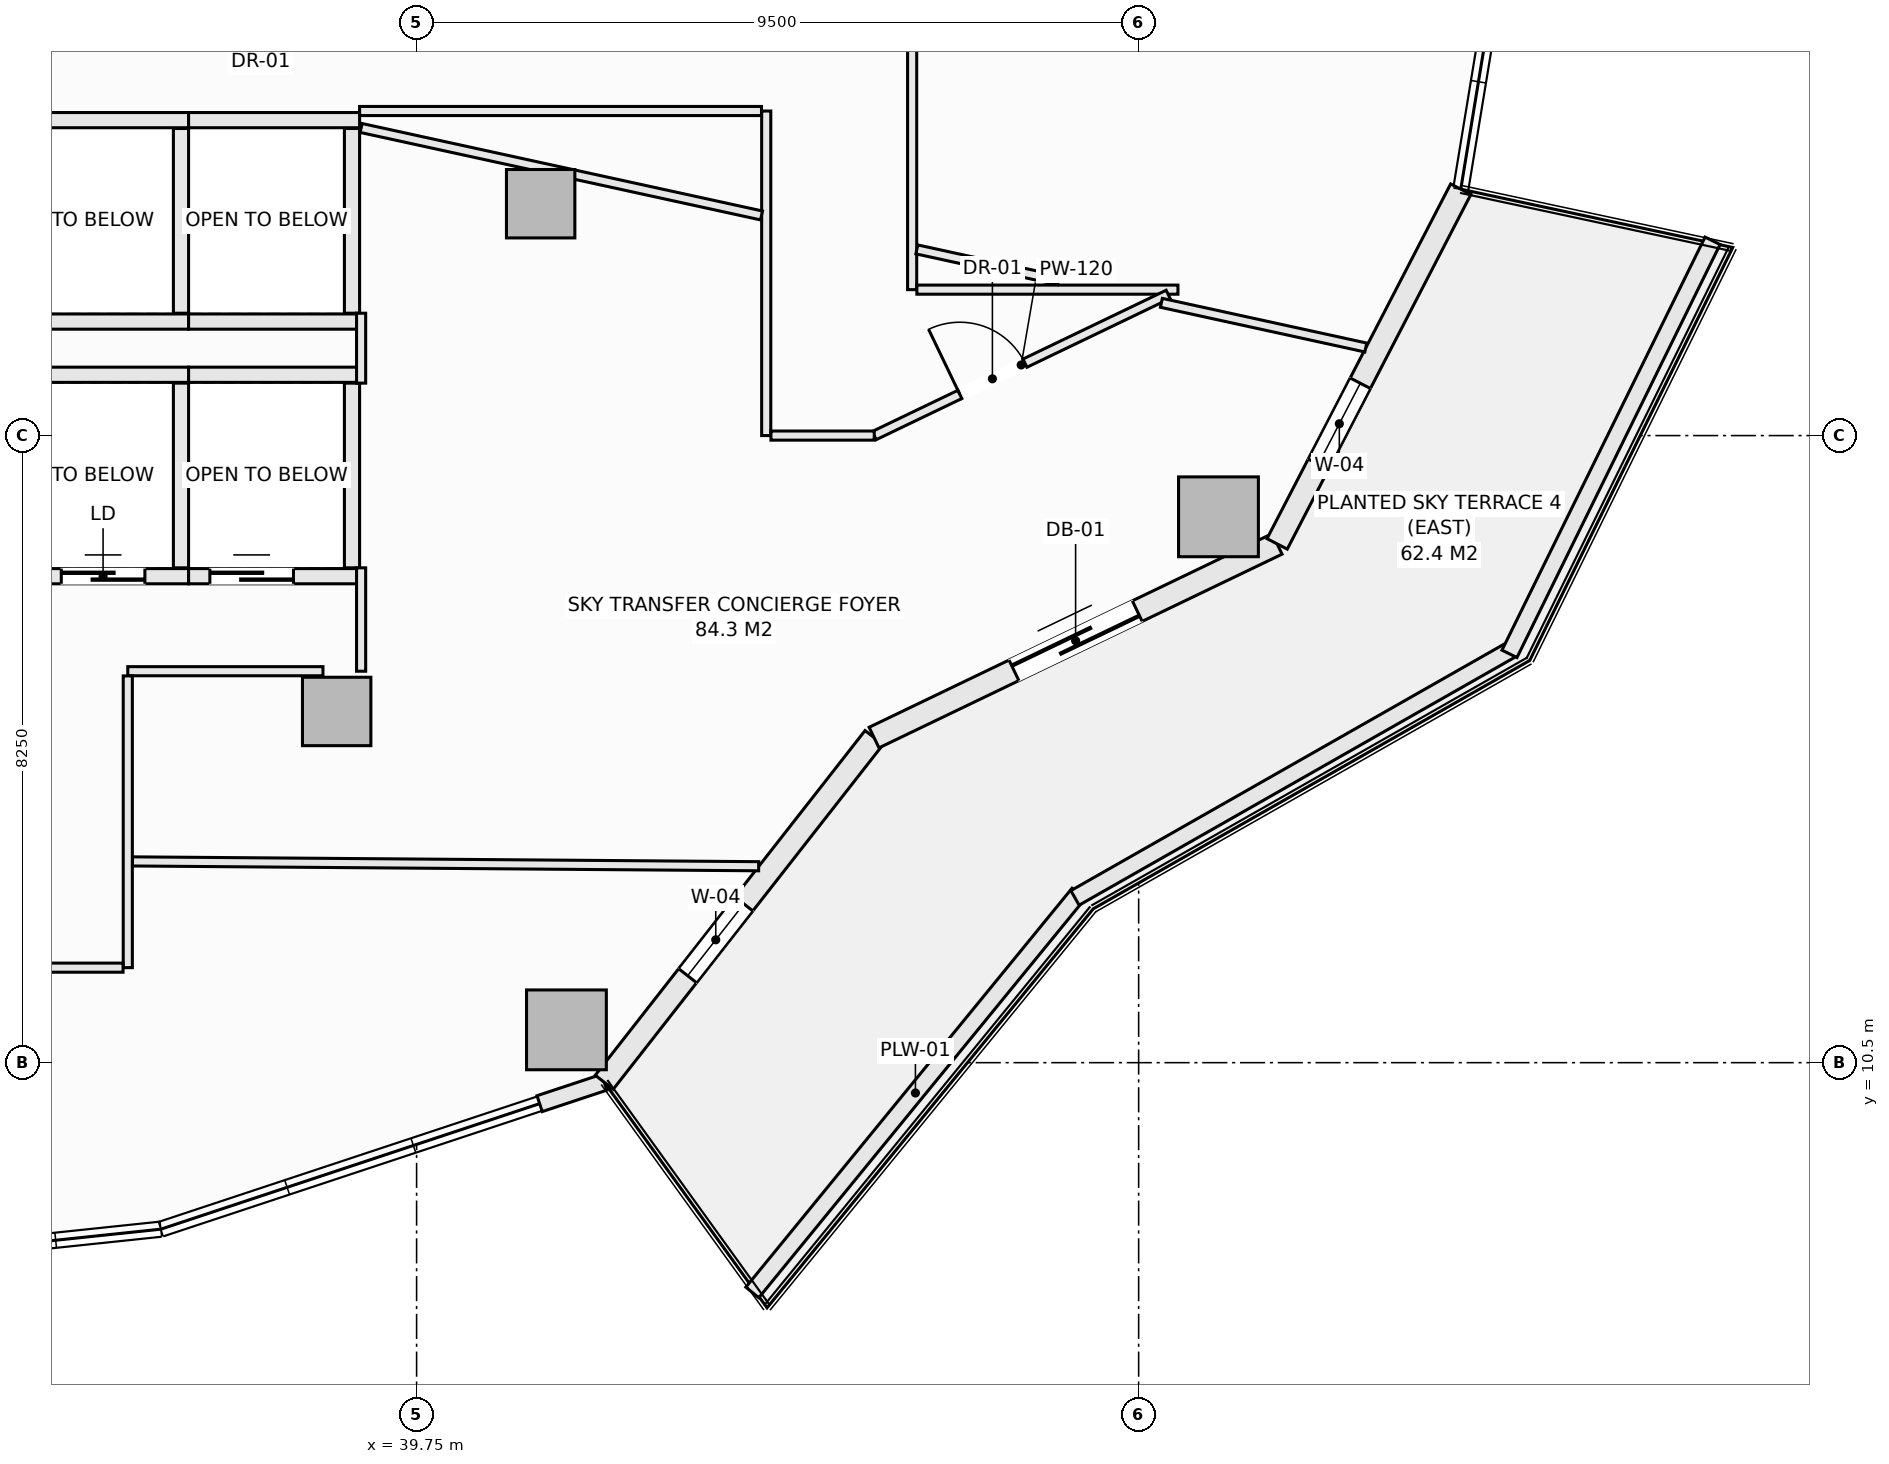
"""IFC4 building model, lengths in metres.
Left out: names, types, materials, properties, quantities, classifications, styles, units other than length and angle.
Written with IfcOpenShell. Run it as: python <this file> out.ifc"""

import sys

from ifc_helpers import new_model, si_unit, direction, frame, frame_2d, origin, origin_2d, place, context, subcontext, project, spatial, rectangle, extrude, element, fill, save


model = new_model("IFC4")
c1 = context("Model", 3, precision=1e-05, world=origin(), true_north=direction((0.0, 1.0)))
c2 = subcontext(c1, "Body", "Model", "MODEL_VIEW")
j1 = project(units=[si_unit("LENGTHUNIT", "METRE"), si_unit("PLANEANGLEUNIT", "RADIAN")], contexts=[c1])
p1 = place(None, origin())
s1 = spatial("IfcSite", under=j1, at=p1, CompositionType="ELEMENT")
p2 = place(p1, origin())
s2 = spatial("IfcBuilding", under=s1, at=p2, CompositionType="ELEMENT")
p3 = place(p2, frame((0.0, 0.0, 100.8)))
s3 = spatial("IfcBuildingStorey", under=s2, at=p3, CompositionType="ELEMENT", Elevation=100.8)
for number, where, z_axis, x_axis in (
    (1, (41.721, 10.932, -0.28), (0.0, 0.0, 1.0), (1.0, 0.0, 0.0)),
    (2, (50.3, 17.681, -0.28), (0.0, 0.0, 1.0), (1.0, 0.0, 0.0)),
):
    element("IfcColumn", number, at=place(p3, frame(where, z_axis=z_axis, x_axis=x_axis)), inside=s3, PredefinedType="COLUMN", context=c2, shape_type="SweptSolid", body=[
        extrude(rectangle(XDim=1.05, YDim=1.05, at=origin_2d()), origin(), (0.0, 0.0, 1.0), 4.51),
    ])
for number, where, z_axis, x_axis in (
    (3, (38.698, 15.121, -0.28), (0.0, 0.0, 1.0), (1.0, 0.0, 0.0)),
    (4, (41.382, 21.801, -0.28), (0.0, 0.0, 1.0), (1.0, 0.0, 0.0)),
):
    element("IfcColumn", number, at=place(p3, frame(where, z_axis=z_axis, x_axis=x_axis)), inside=s3, PredefinedType="COLUMN", context=c2, shape_type="SweptSolid", body=[
        extrude(rectangle(XDim=0.9, YDim=0.9, at=origin_2d()), origin(), (0.0, 0.0, 1.0), 4.51),
    ])
p4 = place(p3, frame((41.369, 9.961, 0.0), z_axis=(0.0, 0.0, 1.0), x_axis=(0.949227107477, 0.314591637573, 0.0)))
e5 = element("IfcWall", 5, at=p4, inside=s3, PredefinedType="SOLIDWALL", context=c2, shape_type="SweptSolid", body=[
    extrude(rectangle(XDim=0.896, YDim=0.22, at=frame_2d((0.448, 0.0))), origin(), (0.0, 0.0, 1.0), 3.753),
])
p5 = place(p3, frame((42.219, 10.242, 0.0), z_axis=(0.0, 0.0, 1.0), x_axis=(0.616435134162, 0.787405693001, 0.0)))
e6 = element("IfcWall", 6, at=p5, inside=s3, PredefinedType="SOLIDWALL", context=c2, shape_type="SweptSolid", body=[
    extrude(rectangle(XDim=5.759, YDim=0.3, at=frame_2d((2.879, 0.0))), origin(), (0.0, 0.0, 1.0), 3.753),
])
p6 = place(p5, frame((1.78, 0.0, 0.72)))
e7 = element("IfcOpeningElement", 7, at=p6, cuts=e6, PredefinedType="OPENING", context=c2, shape_type="SweptSolid", body=[
    extrude(rectangle(XDim=1.2, YDim=1.65, at=frame_2d((0.6, 0.825))), frame((0.0, 0.16, 0.0), z_axis=(0.0, -1.0, 0.0), x_axis=(1.0, 0.0, 0.0)), (0.0, 0.0, 1.0), 0.32),
])
p7 = place(p3, frame((45.769, 14.777, 0.0), z_axis=(0.0, 0.0, 1.0), x_axis=(0.901370184739, 0.433049408339, 0.0)))
e8 = element("IfcWall", 8, at=p7, inside=s3, PredefinedType="SOLIDWALL", context=c2, shape_type="SweptSolid", body=[
    extrude(rectangle(XDim=5.884, YDim=0.3, at=frame_2d((2.942, 0.0))), origin(), (0.0, 0.0, 1.0), 3.753),
])
p8 = place(p7, frame((2.042, 0.0, 0.0)))
e9 = element("IfcOpeningElement", 9, at=p8, cuts=e8, PredefinedType="OPENING", context=c2, shape_type="SweptSolid", body=[
    extrude(rectangle(XDim=1.8, YDim=2.25, at=frame_2d((0.9, 1.125))), frame((0.0, 0.16, 0.0), z_axis=(0.0, -1.0, 0.0), x_axis=(1.0, 0.0, 0.0)), (0.0, 0.0, 1.0), 0.32),
])
p9 = place(p3, frame((51.072, 17.325, 0.0), z_axis=(0.0, 0.0, 1.0), x_axis=(0.459767899643, 0.888039119892, 0.0)))
e10 = element("IfcWall", 10, at=p9, inside=s3, PredefinedType="SOLIDWALL", context=c2, shape_type="SweptSolid", body=[
    extrude(rectangle(XDim=5.255, YDim=0.3, at=frame_2d((2.628, 0.0))), origin(), (0.0, 0.0, 1.0), 3.753),
])
p10 = place(p9, frame((1.18, 0.0, 0.72)))
e11 = element("IfcOpeningElement", 11, at=p10, cuts=e10, PredefinedType="OPENING", context=c2, shape_type="SweptSolid", body=[
    extrude(rectangle(XDim=1.2, YDim=1.65, at=frame_2d((0.6, 0.825))), frame((0.0, 0.16, 0.0), z_axis=(0.0, -1.0, 0.0), x_axis=(1.0, 0.0, 0.0)), (0.0, 0.0, 1.0), 0.32),
])
p11 = place(p3, frame((44.167, 7.477, 0.0), z_axis=(0.0, 0.0, 1.0), x_axis=(0.633002467947, 0.77414977593, 0.0)))
e12 = element("IfcWall", 12, at=p11, inside=s3, PredefinedType="PARAPET", context=c2, shape_type="SweptSolid", body=[
    extrude(rectangle(XDim=6.78, YDim=0.22, at=frame_2d((3.39, 0.0))), origin(), (0.0, 0.0, 1.0), 0.52),
])
p12 = place(p3, frame((48.413, 12.668, 0.0), z_axis=(0.0, 0.0, 1.0), x_axis=(0.869187658335, 0.494482370361, 0.0)))
e13 = element("IfcWall", 13, at=p12, inside=s3, PredefinedType="PARAPET", context=c2, shape_type="SweptSolid", body=[
    extrude(rectangle(XDim=6.606, YDim=0.22, at=frame_2d((3.303, 0.0))), origin(), (0.0, 0.0, 1.0), 0.52),
])
p13 = place(p3, frame((54.129, 15.878, 0.0), z_axis=(0.0, 0.0, 1.0), x_axis=(0.441269631716, 0.897374566235, 0.0)))
e14 = element("IfcWall", 14, at=p13, inside=s3, PredefinedType="PARAPET", context=c2, shape_type="SweptSolid", body=[
    extrude(rectangle(XDim=6.056, YDim=0.22, at=frame_2d((3.028, 0.0))), origin(), (0.0, 0.0, 1.0), 0.52),
])
p14 = place(p3, frame((34.5, 19.55, 0.0), z_axis=(0.0, 0.0, 1.0), x_axis=(1.0, 0.0, 0.0)))
e15 = element("IfcWall", 15, at=p14, inside=s3, PredefinedType="SOLIDWALL", context=c2, shape_type="SweptSolid", body=[
    extrude(rectangle(XDim=2.25, YDim=0.2, at=frame_2d((1.125, 0.0))), origin(), (0.0, 0.0, 1.0), 4.23),
])
p15 = place(p3, frame((34.5, 16.9, 0.0), z_axis=(0.0, 0.0, 1.0), x_axis=(1.0, 0.0, 0.0)))
e16 = element("IfcWall", 16, at=p15, inside=s3, PredefinedType="SOLIDWALL", context=c2, shape_type="SweptSolid", body=[
    extrude(rectangle(XDim=2.25, YDim=0.2, at=frame_2d((1.125, 0.0))), origin(), (0.0, 0.0, 1.0), 4.23),
])
p16 = place(p15, frame((0.575, 0.0, 0.0)))
e17 = element("IfcOpeningElement", 17, at=p16, cuts=e16, PredefinedType="OPENING", context=c2, shape_type="SweptSolid", body=[
    extrude(rectangle(XDim=1.1, YDim=2.2, at=frame_2d((0.55, 1.1))), frame((0.0, 0.11, 0.0), z_axis=(0.0, -1.0, 0.0), x_axis=(1.0, 0.0, 0.0)), (0.0, 0.0, 1.0), 0.22),
])
p17 = place(p3, frame((36.65, 17.01, 0.0), z_axis=(0.0, 0.0, 1.0), x_axis=(0.0, 1.0, 0.0)))
e18 = element("IfcWall", 18, at=p17, inside=s3, PredefinedType="SOLIDWALL", context=c2, shape_type="SweptSolid", body=[
    extrude(rectangle(XDim=2.43, YDim=0.2, at=frame_2d((1.215, 0.0))), origin(), (0.0, 0.0, 1.0), 4.23),
])
p18 = place(p3, frame((36.75, 19.55, 0.0), z_axis=(0.0, 0.0, 1.0), x_axis=(1.0, 0.0, 0.0)))
e19 = element("IfcWall", 19, at=p18, inside=s3, PredefinedType="SOLIDWALL", context=c2, shape_type="SweptSolid", body=[
    extrude(rectangle(XDim=2.25, YDim=0.2, at=frame_2d((1.125, 0.0))), origin(), (0.0, 0.0, 1.0), 4.23),
])
p19 = place(p3, frame((36.75, 16.9, 0.0), z_axis=(0.0, 0.0, 1.0), x_axis=(1.0, 0.0, 0.0)))
e20 = element("IfcWall", 20, at=p19, inside=s3, PredefinedType="SOLIDWALL", context=c2, shape_type="SweptSolid", body=[
    extrude(rectangle(XDim=2.25, YDim=0.2, at=frame_2d((1.125, 0.0))), origin(), (0.0, 0.0, 1.0), 4.23),
])
p20 = place(p19, frame((0.28, 0.0, 0.0)))
e21 = element("IfcOpeningElement", 21, at=p20, cuts=e20, PredefinedType="OPENING", context=c2, shape_type="SweptSolid", body=[
    extrude(rectangle(XDim=1.1, YDim=2.2, at=frame_2d((0.55, 1.1))), frame((0.0, 0.11, 0.0), z_axis=(0.0, -1.0, 0.0), x_axis=(1.0, 0.0, 0.0)), (0.0, 0.0, 1.0), 0.22),
])
p21 = place(p3, frame((38.9, 17.01, 0.0), z_axis=(0.0, 0.0, 1.0), x_axis=(0.0, 1.0, 0.0)))
e22 = element("IfcWall", 22, at=p21, inside=s3, PredefinedType="SOLIDWALL", context=c2, shape_type="SweptSolid", body=[
    extrude(rectangle(XDim=2.43, YDim=0.2, at=frame_2d((1.215, 0.0))), origin(), (0.0, 0.0, 1.0), 4.23),
])
for number, where, z_axis, x_axis in (
    (23, (34.5, 22.9, 0.0), (0.0, 0.0, 1.0), (1.0, 0.0, 0.0)),
    (24, (34.5, 20.25, 0.0), (0.0, 0.0, 1.0), (1.0, 0.0, 0.0)),
):
    element("IfcWall", number, at=place(p3, frame(where, z_axis=z_axis, x_axis=x_axis)), inside=s3, PredefinedType="SOLIDWALL", context=c2, shape_type="SweptSolid", body=[
        extrude(rectangle(XDim=2.25, YDim=0.2, at=frame_2d((1.125, 0.0))), origin(), (0.0, 0.0, 1.0), 4.23),
    ])
p22 = place(p3, frame((36.65, 20.36, 0.0), z_axis=(0.0, 0.0, 1.0), x_axis=(0.0, 1.0, 0.0)))
e25 = element("IfcWall", 25, at=p22, inside=s3, PredefinedType="SOLIDWALL", context=c2, shape_type="SweptSolid", body=[
    extrude(rectangle(XDim=2.43, YDim=0.2, at=frame_2d((1.215, 0.0))), origin(), (0.0, 0.0, 1.0), 4.23),
])
for number, where, z_axis, x_axis in (
    (26, (36.75, 22.9, 0.0), (0.0, 0.0, 1.0), (1.0, 0.0, 0.0)),
    (27, (36.75, 20.25, 0.0), (0.0, 0.0, 1.0), (1.0, 0.0, 0.0)),
):
    element("IfcWall", number, at=place(p3, frame(where, z_axis=z_axis, x_axis=x_axis)), inside=s3, PredefinedType="SOLIDWALL", context=c2, shape_type="SweptSolid", body=[
        extrude(rectangle(XDim=2.25, YDim=0.2, at=frame_2d((1.125, 0.0))), origin(), (0.0, 0.0, 1.0), 4.23),
    ])
p23 = place(p3, frame((38.9, 20.36, 0.0), z_axis=(0.0, 0.0, 1.0), x_axis=(0.0, 1.0, 0.0)))
e28 = element("IfcWall", 28, at=p23, inside=s3, PredefinedType="SOLIDWALL", context=c2, shape_type="SweptSolid", body=[
    extrude(rectangle(XDim=2.43, YDim=0.2, at=frame_2d((1.215, 0.0))), origin(), (0.0, 0.0, 1.0), 4.23),
])
p24 = place(p3, frame((35.95, 15.65, 0.0), z_axis=(0.0, 0.0, 1.0), x_axis=(1.0, 0.0, 0.0)))
e29 = element("IfcWall", 29, at=p24, inside=s3, PredefinedType="PARTITIONING", context=c2, shape_type="SweptSolid", body=[
    extrude(rectangle(XDim=2.568, YDim=0.12, at=frame_2d((1.284, 0.0))), origin(), (0.0, 0.0, 1.0), 4.23),
])
p25 = place(p3, frame((35.95, 11.75, 0.0), z_axis=(0.0, 0.0, 1.0), x_axis=(0.0, 1.0, 0.0)))
e30 = element("IfcWall", 30, at=p25, inside=s3, PredefinedType="PARTITIONING", context=c2, shape_type="SweptSolid", body=[
    extrude(rectangle(XDim=3.838, YDim=0.12, at=frame_2d((1.919, 0.0))), origin(), (0.0, 0.0, 1.0), 4.23),
])
p26 = place(p3, frame((27.227, 11.75, 0.0), z_axis=(0.0, 0.0, 1.0), x_axis=(1.0, 0.0, 0.0)))
e31 = element("IfcWall", 31, at=p26, inside=s3, PredefinedType="PARTITIONING", context=c2, shape_type="SweptSolid", body=[
    extrude(rectangle(XDim=8.661, YDim=0.12, at=frame_2d((4.331, 0.0))), origin(), (0.0, 0.0, 1.0), 4.23),
])
p27 = place(p26, frame((3.855, 0.0, 0.0)))
e32 = element("IfcOpeningElement", 32, at=p27, cuts=e31, PredefinedType="OPENING", context=c2, shape_type="SweptSolid", body=[
    extrude(rectangle(XDim=0.95, YDim=2.1, at=frame_2d((0.475, 1.05))), frame((0.0, 0.07, 0.0), z_axis=(0.0, -1.0, 0.0), x_axis=(1.0, 0.0, 0.0)), (0.0, 0.0, 1.0), 0.14),
])
p28 = place(p3, frame((44.35, 18.75, 0.0), z_axis=(0.0, 0.0, 1.0), x_axis=(0.0, 1.0, 0.0)))
e33 = element("IfcWall", 33, at=p28, inside=s3, PredefinedType="PARTITIONING", context=c2, shape_type="SweptSolid", body=[
    extrude(rectangle(XDim=4.27, YDim=0.12, at=frame_2d((2.135, 0.0))), origin(), (0.0, 0.0, 1.0), 4.23),
])
p29 = place(p3, frame((46.27, 20.67, 0.0), z_axis=(0.0, 0.0, 1.0), x_axis=(0.0, 1.0, 0.0)))
e34 = element("IfcWall", 34, at=p29, inside=s3, PredefinedType="PARTITIONING", context=c2, shape_type="SweptSolid", body=[
    extrude(rectangle(XDim=12.098, YDim=0.12, at=frame_2d((6.049, 0.0))), origin(), (0.0, 0.0, 1.0), 4.23),
])
p30 = place(p29, frame((5.637, 0.0, 0.0)))
e35 = element("IfcOpeningElement", 35, at=p30, cuts=e34, PredefinedType="OPENING", context=c2, shape_type="SweptSolid", body=[
    extrude(rectangle(XDim=0.95, YDim=2.1, at=frame_2d((0.475, 1.05))), frame((0.0, 0.07, 0.0), z_axis=(0.0, -1.0, 0.0), x_axis=(1.0, 0.0, 0.0)), (0.0, 0.0, 1.0), 0.14),
])
p31 = place(p3, frame((46.332, 20.67, 0.0), z_axis=(0.0, 0.0, 1.0), x_axis=(1.0, 0.0, 0.0)))
e36 = element("IfcWall", 36, at=p31, inside=s3, PredefinedType="PARTITIONING", context=c2, shape_type="SweptSolid", body=[
    extrude(rectangle(XDim=3.435, YDim=0.12, at=frame_2d((1.718, 0.0))), origin(), (0.0, 0.0, 1.0), 4.23),
])
p32 = place(p3, frame((45.771, 18.75, 0.0), z_axis=(0.0, 0.0, 1.0), x_axis=(0.901361373705, 0.433067747578, 0.0)))
e37 = element("IfcWall", 37, at=p32, inside=s3, PredefinedType="PARTITIONING", context=c2, shape_type="SweptSolid", body=[
    extrude(rectangle(XDim=4.29, YDim=0.12, at=frame_2d((2.145, 0.0))), origin(), (0.0, 0.0, 1.0), 4.23),
])
p33 = place(p32, frame((1.25, 0.0, 0.0)))
e38 = element("IfcOpeningElement", 38, at=p33, cuts=e37, PredefinedType="OPENING", context=c2, shape_type="SweptSolid", body=[
    extrude(rectangle(XDim=0.95, YDim=2.1, at=frame_2d((0.475, 1.05))), frame((0.0, 0.07, 0.0), z_axis=(0.0, -1.0, 0.0), x_axis=(1.0, 0.0, 0.0)), (0.0, 0.0, 1.0), 0.14),
])
p34 = place(p3, frame((44.412, 18.75, 0.0), z_axis=(0.0, 0.0, 1.0), x_axis=(1.0, 0.0, 0.0)))
e39 = element("IfcWall", 39, at=p34, inside=s3, PredefinedType="PARTITIONING", context=c2, shape_type="SweptSolid", body=[
    extrude(rectangle(XDim=1.359, YDim=0.12, at=frame_2d((0.679, 0.0))), origin(), (0.0, 0.0, 1.0), 4.23),
])
p35 = place(p3, frame((39.0, 23.02, 0.0), z_axis=(0.0, 0.0, 1.0), x_axis=(1.0, 0.0, 0.0)))
e40 = element("IfcWall", 40, at=p35, inside=s3, PredefinedType="PARTITIONING", context=c2, shape_type="SweptSolid", body=[
    extrude(rectangle(XDim=5.288, YDim=0.12, at=frame_2d((2.644, 0.0))), origin(), (0.0, 0.0, 1.0), 4.23),
])
p36 = place(p3, frame((39.02, 15.65, 0.0), z_axis=(0.0, 0.0, 1.0), x_axis=(0.0, 1.0, 0.0)))
e41 = element("IfcWall", 41, at=p36, inside=s3, PredefinedType="PARTITIONING", context=c2, shape_type="SweptSolid", body=[
    extrude(rectangle(XDim=1.36, YDim=0.12, at=frame_2d((0.68, 0.0))), origin(), (0.0, 0.0, 1.0), 3.605),
])
p37 = place(p3, frame((39.02, 19.44, 0.0), z_axis=(0.0, 0.0, 1.0), x_axis=(0.0, 1.0, 0.0)))
e42 = element("IfcWall", 42, at=p37, inside=s3, PredefinedType="PARTITIONING", context=c2, shape_type="SweptSolid", body=[
    extrude(rectangle(XDim=0.92, YDim=0.12, at=frame_2d((0.46, 0.0))), origin(), (0.0, 0.0, 1.0), 4.23),
])
p38 = place(p3, frame((39.02, 22.797, 0.0), z_axis=(0.0, 0.0, 1.0), x_axis=(0.976958463648, -0.213429520699, 0.0)))
e43 = element("IfcWall", 43, at=p38, inside=s3, PredefinedType="PARTITIONING", context=c2, shape_type="SweptSolid", body=[
    extrude(rectangle(XDim=5.392, YDim=0.12, at=frame_2d((2.696, 0.0))), origin(), (0.0, 0.0, 1.0), 4.23),
])
p39 = place(p3, frame((46.332, 21.199, 0.0), z_axis=(0.0, 0.0, 1.0), x_axis=(0.976969234372, -0.213380212509, 0.0)))
e44 = element("IfcWall", 44, at=p39, inside=s3, PredefinedType="PARTITIONING", context=c2, shape_type="SweptSolid", body=[
    extrude(rectangle(XDim=1.908, YDim=0.12, at=frame_2d((0.954, 0.0))), origin(), (0.0, 0.0, 1.0), 4.23),
])
p40 = place(p3, frame((49.549, 20.497, 0.0), z_axis=(0.0, 0.0, 1.0), x_axis=(0.97693240482, -0.213548768229, 0.0)))
e45 = element("IfcWall", 45, at=p40, inside=s3, PredefinedType="PARTITIONING", context=c2, shape_type="SweptSolid", body=[
    extrude(rectangle(XDim=2.753, YDim=0.12, at=frame_2d((1.376, 0.0))), origin(), (0.0, 0.0, 1.0), 4.23),
])
p41 = place(p3, frame((36.012, 13.148, 0.0), z_axis=(0.0, 0.0, 1.0), x_axis=(0.999970319002, -0.007704616475, 0.0)))
e46 = element("IfcWall", 46, at=p41, inside=s3, PredefinedType="PARTITIONING", context=c2, shape_type="SweptSolid", body=[
    extrude(rectangle(XDim=8.239, YDim=0.12, at=frame_2d((4.119, 0.0))), origin(), (0.0, 0.0, 1.0), 3.753),
])
p42 = place(p6, origin())
e47 = element("IfcWindow", 47, at=p42, inside=s3, PartitioningType="SINGLE_PANEL", PredefinedType="WINDOW", context=c2, shape_type="SweptSolid", body=[
    extrude(rectangle(XDim=1.2, YDim=1.65, at=frame_2d((0.6, 0.825))), frame((0.0, 0.03, 0.0), z_axis=(0.0, -1.0, 0.0), x_axis=(1.0, 0.0, 0.0)), (0.0, 0.0, 1.0), 0.06),
])
fill(e7, e47)
p43 = place(p8, frame((1.8, 0.0, 0.0), z_axis=(0.0, 0.0, 1.0), x_axis=(-1.0, 0.0, 0.0)))
e48 = element("IfcDoor", 48, at=p43, inside=s3, OperationType="SLIDING_TO_LEFT", PredefinedType="DOOR", context=c2, shape_type="SweptSolid", body=[
    extrude(rectangle(XDim=1.8, YDim=2.25, at=frame_2d((0.9, 1.125))), frame((0.0, 0.025, 0.0), z_axis=(0.0, -1.0, 0.0), x_axis=(1.0, 0.0, 0.0)), (0.0, 0.0, 1.0), 0.05),
])
fill(e9, e48)
p44 = place(p10, origin())
e49 = element("IfcWindow", 49, at=p44, inside=s3, PartitioningType="SINGLE_PANEL", PredefinedType="WINDOW", context=c2, shape_type="SweptSolid", body=[
    extrude(rectangle(XDim=1.2, YDim=1.65, at=frame_2d((0.6, 0.825))), frame((0.0, 0.03, 0.0), z_axis=(0.0, -1.0, 0.0), x_axis=(1.0, 0.0, 0.0)), (0.0, 0.0, 1.0), 0.06),
])
fill(e11, e49)
p45 = place(p16, origin())
e50 = element("IfcDoor", 50, at=p45, inside=s3, OperationType="SLIDING_TO_LEFT", PredefinedType="DOOR", context=c2, shape_type="SweptSolid", body=[
    extrude(rectangle(XDim=1.1, YDim=2.2, at=frame_2d((0.55, 1.1))), frame((0.0, 0.025, 0.0), z_axis=(0.0, -1.0, 0.0), x_axis=(1.0, 0.0, 0.0)), (0.0, 0.0, 1.0), 0.05),
])
fill(e17, e50)
p46 = place(p20, origin())
e51 = element("IfcDoor", 51, at=p46, inside=s3, OperationType="SLIDING_TO_LEFT", PredefinedType="DOOR", context=c2, shape_type="SweptSolid", body=[
    extrude(rectangle(XDim=1.1, YDim=2.2, at=frame_2d((0.55, 1.1))), frame((0.0, 0.025, 0.0), z_axis=(0.0, -1.0, 0.0), x_axis=(1.0, 0.0, 0.0)), (0.0, 0.0, 1.0), 0.05),
])
fill(e21, e51)
p47 = place(p33, origin())
e52 = element("IfcDoor", 52, at=p47, inside=s3, OperationType="SINGLE_SWING_LEFT", PredefinedType="DOOR", context=c2, shape_type="SweptSolid", body=[
    extrude(rectangle(XDim=0.95, YDim=2.1, at=frame_2d((0.475, 1.05))), frame((0.0, 0.025, 0.0), z_axis=(0.0, -1.0, 0.0), x_axis=(1.0, 0.0, 0.0)), (0.0, 0.0, 1.0), 0.05),
])
fill(e38, e52)
save(model, sys.argv[1])
